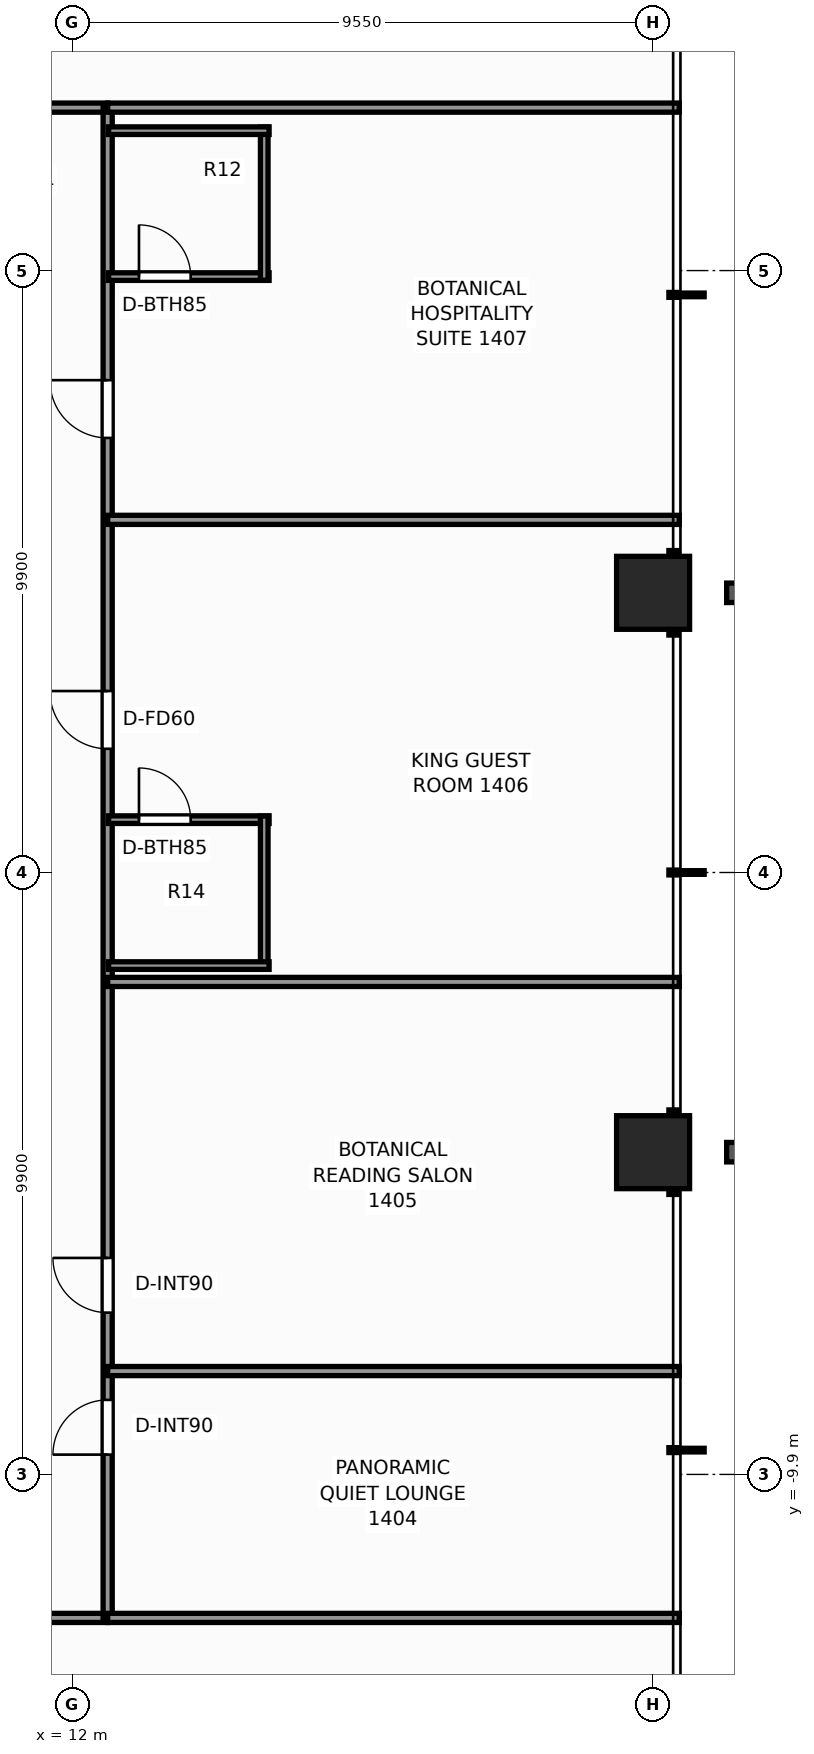
"""IFC4 building model, lengths in metres.
Left out: names, types, materials, properties, quantities, classifications, styles, units other than length and angle.
Written with IfcOpenShell. Run it as: python <this file> out.ifc"""

import sys

from ifc_helpers import new_model, si_unit, direction, frame, frame_2d, origin, origin_2d, place, context, subcontext, project, spatial, rectangle, extrude, element, fill, save


model = new_model("IFC4")
c1 = context("Model", 3, precision=1e-05, world=origin(), true_north=direction((0.0, 1.0)))
c2 = subcontext(c1, "Body", "Model", "MODEL_VIEW")
j1 = project(units=[si_unit("LENGTHUNIT", "METRE"), si_unit("PLANEANGLEUNIT", "RADIAN")], contexts=[c1])
p1 = place(None, origin())
s1 = spatial("IfcSite", under=j1, at=p1, CompositionType="ELEMENT")
p2 = place(p1, origin())
s2 = spatial("IfcBuilding", under=s1, at=p2, CompositionType="ELEMENT")
p3 = place(p2, frame((0.0, 0.0, 50.2)))
s3 = spatial("IfcBuildingStorey", under=s2, at=p3, CompositionType="ELEMENT", Elevation=50.2)
for number, where, z_axis, x_axis in (
    (1, (21.55, -4.6, 0.0), (0.0, 0.0, 1.0), (1.0, 0.0, 0.0)),
    (2, (21.55, 4.6, 0.0), (0.0, 0.0, 1.0), (1.0, 0.0, 0.0)),
):
    element("IfcColumn", number, at=place(p3, frame(where, z_axis=z_axis, x_axis=x_axis)), inside=s3, PredefinedType="COLUMN", context=c2, shape_type="SweptSolid", body=[
        extrude(rectangle(XDim=1.2, YDim=1.2, at=origin_2d()), origin(), (0.0, 0.0, 1.0), 3.3),
    ])
p4 = place(p3, frame((-12.26, -12.26, 0.0), z_axis=(0.0, 0.0, 1.0), x_axis=(1.0, 0.0, 0.0)))
e3 = element("IfcWall", 3, at=p4, inside=s3, PredefinedType="PARTITIONING", context=c2, shape_type="SweptSolid", body=[
    extrude(rectangle(XDim=24.84, YDim=0.15, at=frame_2d((12.42, 0.0))), origin(), (0.0, 0.0, 1.0), 2.272),
])
p5 = place(p4, frame((3.203, 0.0, 0.0)))
e4 = element("IfcOpeningElement", 4, at=p5, cuts=e3, PredefinedType="OPENING", context=c2, shape_type="SweptSolid", body=[
    extrude(rectangle(XDim=0.9, YDim=2.06, at=frame_2d((0.45, 1.03))), frame((0.0, 0.085, 0.0), z_axis=(0.0, -1.0, 0.0), x_axis=(1.0, 0.0, 0.0)), (0.0, 0.0, 1.0), 0.17),
])
p6 = place(p4, frame((5.628, 0.0, 0.0)))
e5 = element("IfcOpeningElement", 5, at=p6, cuts=e3, PredefinedType="OPENING", context=c2, shape_type="SweptSolid", body=[
    extrude(rectangle(XDim=0.9, YDim=2.06, at=frame_2d((0.45, 1.03))), frame((0.0, 0.085, 0.0), z_axis=(0.0, -1.0, 0.0), x_axis=(1.0, 0.0, 0.0)), (0.0, 0.0, 1.0), 0.17),
])
p7 = place(p4, frame((8.611, 0.0, 0.0)))
e6 = element("IfcOpeningElement", 6, at=p7, cuts=e3, PredefinedType="OPENING", context=c2, shape_type="SweptSolid", body=[
    extrude(rectangle(XDim=0.95, YDim=2.06, at=frame_2d((0.475, 1.03))), frame((0.0, 0.085, 0.0), z_axis=(0.0, -1.0, 0.0), x_axis=(1.0, 0.0, 0.0)), (0.0, 0.0, 1.0), 0.17),
])
p8 = place(p4, frame((13.84, 0.0, 0.0)))
e7 = element("IfcOpeningElement", 7, at=p8, cuts=e3, PredefinedType="OPENING", context=c2, shape_type="SweptSolid", body=[
    extrude(rectangle(XDim=0.9, YDim=2.06, at=frame_2d((0.45, 1.03))), frame((0.0, 0.085, 0.0), z_axis=(0.0, -1.0, 0.0), x_axis=(1.0, 0.0, 0.0)), (0.0, 0.0, 1.0), 0.17),
])
p9 = place(p4, frame((19.542, 0.0, 0.0)))
e8 = element("IfcOpeningElement", 8, at=p9, cuts=e3, PredefinedType="OPENING", context=c2, shape_type="SweptSolid", body=[
    extrude(rectangle(XDim=0.9, YDim=2.06, at=frame_2d((0.45, 1.03))), frame((0.0, 0.085, 0.0), z_axis=(0.0, -1.0, 0.0), x_axis=(1.0, 0.0, 0.0)), (0.0, 0.0, 1.0), 0.17),
])
p10 = place(p3, frame((-12.26, 12.58, 0.0), z_axis=(0.0, 0.0, 1.0), x_axis=(1.0, 0.0, 0.0)))
e9 = element("IfcWall", 9, at=p10, inside=s3, PredefinedType="PARTITIONING", context=c2, shape_type="SweptSolid", body=[
    extrude(rectangle(XDim=24.84, YDim=0.15, at=frame_2d((12.42, 0.0))), origin(), (0.0, 0.0, 1.0), 2.272),
])
p11 = place(p10, frame((3.462, 0.0, 0.0)))
e10 = element("IfcOpeningElement", 10, at=p11, cuts=e9, PredefinedType="OPENING", context=c2, shape_type="SweptSolid", body=[
    extrude(rectangle(XDim=0.9, YDim=2.06, at=frame_2d((0.45, 1.03))), frame((0.0, 0.085, 0.0), z_axis=(0.0, -1.0, 0.0), x_axis=(1.0, 0.0, 0.0)), (0.0, 0.0, 1.0), 0.17),
])
p12 = place(p10, frame((8.723, 0.0, 0.0)))
e11 = element("IfcOpeningElement", 11, at=p12, cuts=e9, PredefinedType="OPENING", context=c2, shape_type="SweptSolid", body=[
    extrude(rectangle(XDim=0.95, YDim=2.06, at=frame_2d((0.475, 1.03))), frame((0.0, 0.085, 0.0), z_axis=(0.0, -1.0, 0.0), x_axis=(1.0, 0.0, 0.0)), (0.0, 0.0, 1.0), 0.17),
])
p13 = place(p10, frame((14.157, 0.0, 0.0)))
e12 = element("IfcOpeningElement", 12, at=p13, cuts=e9, PredefinedType="OPENING", context=c2, shape_type="SweptSolid", body=[
    extrude(rectangle(XDim=0.95, YDim=2.06, at=frame_2d((0.475, 1.03))), frame((0.0, 0.085, 0.0), z_axis=(0.0, -1.0, 0.0), x_axis=(1.0, 0.0, 0.0)), (0.0, 0.0, 1.0), 0.17),
])
p14 = place(p10, frame((19.542, 0.0, 0.0)))
e13 = element("IfcOpeningElement", 13, at=p14, cuts=e9, PredefinedType="OPENING", context=c2, shape_type="SweptSolid", body=[
    extrude(rectangle(XDim=0.9, YDim=2.06, at=frame_2d((0.45, 1.03))), frame((0.0, 0.085, 0.0), z_axis=(0.0, -1.0, 0.0), x_axis=(1.0, 0.0, 0.0)), (0.0, 0.0, 1.0), 0.17),
])
p15 = place(p3, frame((12.58, -12.26, 0.0), z_axis=(0.0, 0.0, 1.0), x_axis=(0.0, 1.0, 0.0)))
e14 = element("IfcWall", 14, at=p15, inside=s3, PredefinedType="PARTITIONING", context=c2, shape_type="SweptSolid", body=[
    extrude(rectangle(XDim=24.84, YDim=0.15, at=frame_2d((12.42, 0.0))), origin(), (0.0, 0.0, 1.0), 2.272),
])
p16 = place(p15, frame((2.686, 0.0, 0.0)))
e15 = element("IfcOpeningElement", 15, at=p16, cuts=e14, PredefinedType="OPENING", context=c2, shape_type="SweptSolid", body=[
    extrude(rectangle(XDim=0.9, YDim=2.06, at=frame_2d((0.45, 1.03))), frame((0.0, 0.085, 0.0), z_axis=(0.0, -1.0, 0.0), x_axis=(1.0, 0.0, 0.0)), (0.0, 0.0, 1.0), 0.17),
])
p17 = place(p15, frame((5.021, 0.0, 0.0)))
e16 = element("IfcOpeningElement", 16, at=p17, cuts=e14, PredefinedType="OPENING", context=c2, shape_type="SweptSolid", body=[
    extrude(rectangle(XDim=0.9, YDim=2.06, at=frame_2d((0.45, 1.03))), frame((0.0, 0.085, 0.0), z_axis=(0.0, -1.0, 0.0), x_axis=(1.0, 0.0, 0.0)), (0.0, 0.0, 1.0), 0.17),
])
p18 = place(p15, frame((14.294, 0.0, 0.0)))
e17 = element("IfcOpeningElement", 17, at=p18, cuts=e14, PredefinedType="OPENING", context=c2, shape_type="SweptSolid", body=[
    extrude(rectangle(XDim=0.95, YDim=2.06, at=frame_2d((0.475, 1.03))), frame((0.0, 0.085, 0.0), z_axis=(0.0, -1.0, 0.0), x_axis=(1.0, 0.0, 0.0)), (0.0, 0.0, 1.0), 0.17),
])
p19 = place(p15, frame((19.407, 0.0, 0.0)))
e18 = element("IfcOpeningElement", 18, at=p19, cuts=e14, PredefinedType="OPENING", context=c2, shape_type="SweptSolid", body=[
    extrude(rectangle(XDim=0.95, YDim=2.06, at=frame_2d((0.475, 1.03))), frame((0.0, 0.085, 0.0), z_axis=(0.0, -1.0, 0.0), x_axis=(1.0, 0.0, 0.0)), (0.0, 0.0, 1.0), 0.17),
])
for number, where, z_axis, x_axis in (
    (19, (12.58, -12.26, 0.0), (0.0, 0.0, 1.0), (1.0, 0.0, 0.0)),
    (20, (12.58, 12.58, 0.0), (0.0, 0.0, 1.0), (1.0, 0.0, 0.0)),
):
    element("IfcWall", number, at=place(p3, frame(where, z_axis=z_axis, x_axis=x_axis)), inside=s3, PredefinedType="PARTITIONING", context=c2, shape_type="SweptSolid", body=[
        extrude(rectangle(XDim=9.4, YDim=0.15, at=frame_2d((4.7, 0.0))), origin(), (0.0, 0.0, 1.0), 2.272),
    ])
for number, where, z_axis, x_axis in (
    (21, (12.58, -8.2, 0.0), (0.0, 0.0, 1.0), (1.0, 0.0, 0.0)),
    (22, (12.58, -1.8, 0.0), (0.0, 0.0, 1.0), (1.0, 0.0, 0.0)),
    (23, (12.58, 5.8, 0.0), (0.0, 0.0, 1.0), (1.0, 0.0, 0.0)),
):
    element("IfcWall", number, at=place(p3, frame(where, z_axis=z_axis, x_axis=x_axis)), inside=s3, PredefinedType="PARTITIONING", context=c2, shape_type="SweptSolid", body=[
        extrude(rectangle(XDim=9.4, YDim=0.15, at=frame_2d((4.7, 0.0))), origin(), (0.0, 0.0, 1.0), 2.429),
    ])
p20 = place(p3, frame((12.595, 0.869, 0.0), z_axis=(0.0, 0.0, 1.0), x_axis=(1.0, 0.0, 0.0)))
e24 = element("IfcWall", 24, at=p20, inside=s3, PredefinedType="PARTITIONING", context=c2, shape_type="SweptSolid", body=[
    extrude(rectangle(XDim=2.64, YDim=0.125, at=frame_2d((1.32, 0.0))), origin(), (0.0, 0.0, 1.0), 3.06),
])
p21 = place(p20, frame((0.5, 0.0, 0.0)))
e25 = element("IfcOpeningElement", 25, at=p21, cuts=e24, PredefinedType="OPENING", context=c2, shape_type="SweptSolid", body=[
    extrude(rectangle(XDim=0.85, YDim=2.03, at=frame_2d((0.425, 1.015))), frame((0.0, 0.073, 0.0), z_axis=(0.0, -1.0, 0.0), x_axis=(1.0, 0.0, 0.0)), (0.0, 0.0, 1.0), 0.145),
])
p22 = place(p3, frame((15.155, -1.591, 0.0), z_axis=(0.0, 0.0, 1.0), x_axis=(0.0, 1.0, 0.0)))
e26 = element("IfcWall", 26, at=p22, inside=s3, PredefinedType="PARTITIONING", context=c2, shape_type="SweptSolid", body=[
    extrude(rectangle(XDim=2.52, YDim=0.125, at=frame_2d((1.26, 0.0))), origin(), (0.0, 0.0, 1.0), 2.585),
])
p23 = place(p3, frame((12.595, -1.531, 0.0), z_axis=(0.0, 0.0, 1.0), x_axis=(1.0, 0.0, 0.0)))
e27 = element("IfcWall", 27, at=p23, inside=s3, PredefinedType="PARTITIONING", context=c2, shape_type="SweptSolid", body=[
    extrude(rectangle(XDim=2.64, YDim=0.125, at=frame_2d((1.32, 0.0))), origin(), (0.0, 0.0, 1.0), 3.06),
])
p24 = place(p3, frame((12.595, 9.801, 0.0), z_axis=(0.0, 0.0, 1.0), x_axis=(1.0, 0.0, 0.0)))
e28 = element("IfcWall", 28, at=p24, inside=s3, PredefinedType="PARTITIONING", context=c2, shape_type="SweptSolid", body=[
    extrude(rectangle(XDim=2.64, YDim=0.125, at=frame_2d((1.32, 0.0))), origin(), (0.0, 0.0, 1.0), 3.06),
])
p25 = place(p24, frame((0.5, 0.0, 0.0)))
e29 = element("IfcOpeningElement", 29, at=p25, cuts=e28, PredefinedType="OPENING", context=c2, shape_type="SweptSolid", body=[
    extrude(rectangle(XDim=0.85, YDim=2.03, at=frame_2d((0.425, 1.015))), frame((0.0, 0.073, 0.0), z_axis=(0.0, -1.0, 0.0), x_axis=(1.0, 0.0, 0.0)), (0.0, 0.0, 1.0), 0.145),
])
p26 = place(p3, frame((15.155, 9.741, 0.0), z_axis=(0.0, 0.0, 1.0), x_axis=(0.0, 1.0, 0.0)))
e30 = element("IfcWall", 30, at=p26, inside=s3, PredefinedType="PARTITIONING", context=c2, shape_type="SweptSolid", body=[
    extrude(rectangle(XDim=2.52, YDim=0.125, at=frame_2d((1.26, 0.0))), origin(), (0.0, 0.0, 1.0), 2.272),
])
p27 = place(p3, frame((12.595, 12.201, 0.0), z_axis=(0.0, 0.0, 1.0), x_axis=(1.0, 0.0, 0.0)))
e31 = element("IfcWall", 31, at=p27, inside=s3, PredefinedType="PARTITIONING", context=c2, shape_type="SweptSolid", body=[
    extrude(rectangle(XDim=2.64, YDim=0.125, at=frame_2d((1.32, 0.0))), origin(), (0.0, 0.0, 1.0), 2.272),
])
p28 = place(p16, origin())
e32 = element("IfcDoor", 32, at=p28, inside=s3, OperationType="SINGLE_SWING_LEFT", PredefinedType="DOOR", context=c2, shape_type="SweptSolid", body=[
    extrude(rectangle(XDim=0.9, YDim=2.06, at=frame_2d((0.45, 1.03))), frame((0.0, 0.025, 0.0), z_axis=(0.0, -1.0, 0.0), x_axis=(1.0, 0.0, 0.0)), (0.0, 0.0, 1.0), 0.05),
])
fill(e15, e32)
p29 = place(p17, origin())
e33 = element("IfcDoor", 33, at=p29, inside=s3, OperationType="SINGLE_SWING_RIGHT", PredefinedType="DOOR", context=c2, shape_type="SweptSolid", body=[
    extrude(rectangle(XDim=0.9, YDim=2.06, at=frame_2d((0.45, 1.03))), frame((0.0, 0.025, 0.0), z_axis=(0.0, -1.0, 0.0), x_axis=(1.0, 0.0, 0.0)), (0.0, 0.0, 1.0), 0.05),
])
fill(e16, e33)
p30 = place(p21, origin())
e34 = element("IfcDoor", 34, at=p30, inside=s3, OperationType="SINGLE_SWING_LEFT", PredefinedType="DOOR", context=c2, shape_type="SweptSolid", body=[
    extrude(rectangle(XDim=0.85, YDim=2.03, at=frame_2d((0.425, 1.015))), frame((0.0, 0.025, 0.0), z_axis=(0.0, -1.0, 0.0), x_axis=(1.0, 0.0, 0.0)), (0.0, 0.0, 1.0), 0.05),
])
fill(e25, e34)
p31 = place(p18, origin())
e35 = element("IfcDoor", 35, at=p31, inside=s3, OperationType="SINGLE_SWING_RIGHT", PredefinedType="DOOR", context=c2, shape_type="SweptSolid", body=[
    extrude(rectangle(XDim=0.95, YDim=2.06, at=frame_2d((0.475, 1.03))), frame((0.0, 0.025, 0.0), z_axis=(0.0, -1.0, 0.0), x_axis=(1.0, 0.0, 0.0)), (0.0, 0.0, 1.0), 0.05),
])
fill(e17, e35)
p32 = place(p25, origin())
e36 = element("IfcDoor", 36, at=p32, inside=s3, OperationType="SINGLE_SWING_LEFT", PredefinedType="DOOR", context=c2, shape_type="SweptSolid", body=[
    extrude(rectangle(XDim=0.85, YDim=2.03, at=frame_2d((0.425, 1.015))), frame((0.0, 0.025, 0.0), z_axis=(0.0, -1.0, 0.0), x_axis=(1.0, 0.0, 0.0)), (0.0, 0.0, 1.0), 0.05),
])
fill(e29, e36)
p33 = place(p19, origin())
e37 = element("IfcDoor", 37, at=p33, inside=s3, OperationType="SINGLE_SWING_RIGHT", PredefinedType="DOOR", context=c2, shape_type="SweptSolid", body=[
    extrude(rectangle(XDim=0.95, YDim=2.06, at=frame_2d((0.475, 1.03))), frame((0.0, 0.025, 0.0), z_axis=(0.0, -1.0, 0.0), x_axis=(1.0, 0.0, 0.0)), (0.0, 0.0, 1.0), 0.05),
])
fill(e18, e37)
save(model, sys.argv[1])
